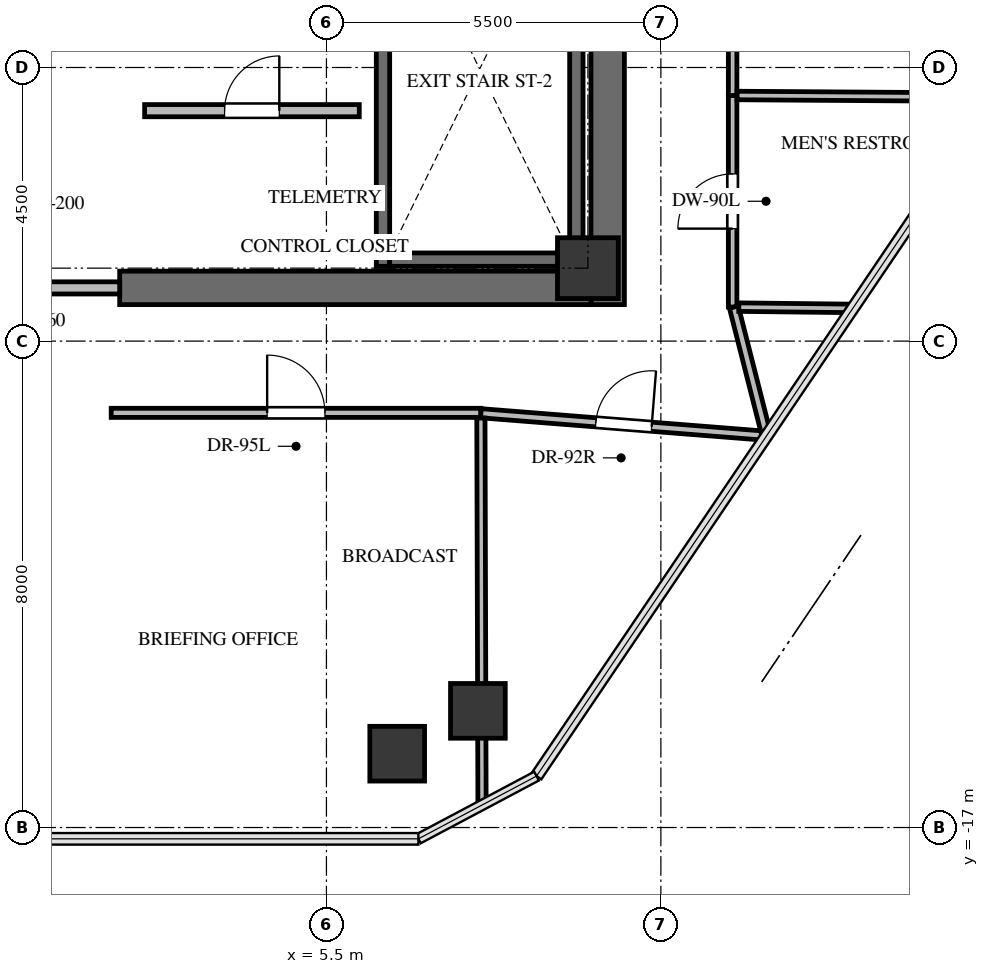
"""IFC4 building model, lengths in metres.
Left out: names, types, materials, properties, quantities, classifications, styles, units other than length and angle.
Written with IfcOpenShell. Run it as: python <this file> out.ifc"""

import sys

from ifc_helpers import new_model, si_unit, direction, frame, frame_2d, origin, origin_2d, place, context, subcontext, project, spatial, rectangle, extrude, source, transform, mapped, element, fill, save


model = new_model("IFC4")
c1 = context("Model", 3, precision=1e-05, world=origin(), true_north=direction((0.0, 1.0)))
c2 = subcontext(c1, "Body", "Model", "MODEL_VIEW")
j1 = project(units=[si_unit("LENGTHUNIT", "METRE"), si_unit("PLANEANGLEUNIT", "RADIAN")], contexts=[c1])
p1 = place(None, origin())
s1 = spatial("IfcSite", under=j1, at=p1, CompositionType="ELEMENT")
p2 = place(p1, origin())
s2 = spatial("IfcBuilding", under=s1, at=p2, CompositionType="ELEMENT")
p3 = place(p2, frame((0.0, 0.0, 231.5)))
s3 = spatial("IfcBuildingStorey", under=s2, at=p3, CompositionType="ELEMENT", Elevation=231.5)
p4 = place(p3, frame((10.125, -8.4, 0.0), z_axis=(0.0, 0.0, 1.0), x_axis=(0.0, 1.0, 0.0)))
e1 = element("IfcWall", 1, at=p4, inside=s3, PredefinedType="SHEAR", context=c2, shape_type="SweptSolid", body=[
    extrude(rectangle(XDim=16.8, YDim=0.55, at=frame_2d((8.4, 0.0))), origin(), (0.0, 0.0, 1.0), 3.3),
])
p5 = place(p3, frame((2.1, -8.125, 0.0), z_axis=(0.0, 0.0, 1.0), x_axis=(1.0, 0.0, 0.0)))
e2 = element("IfcWall", 2, at=p5, inside=s3, PredefinedType="SHEAR", context=c2, shape_type="SweptSolid", body=[
    extrude(rectangle(XDim=7.75, YDim=0.55, at=frame_2d((3.875, 0.0))), origin(), (0.0, 0.0, 1.0), 3.3),
])
p6 = place(p3, frame((9.61, -7.77, -0.24), z_axis=(0.0, 0.0, 1.0), x_axis=(0.0, 1.0, 0.0)))
e3 = element("IfcWall", 3, at=p6, inside=s3, PredefinedType="SHEAR", context=c2, shape_type="SweptSolid", body=[
    extrude(rectangle(XDim=7.89, YDim=0.22, at=frame_2d((3.945, 0.0))), origin(), (0.0, 0.0, 1.0), 3.3),
])
p7 = place(p3, frame((6.43, 0.12, -0.24), z_axis=(0.0, 0.0, 1.0), x_axis=(0.0, -1.0, 0.0)))
e4 = element("IfcWall", 4, at=p7, inside=s3, PredefinedType="SHEAR", context=c2, shape_type="SweptSolid", body=[
    extrude(rectangle(XDim=7.89, YDim=0.22, at=frame_2d((3.945, 0.0))), origin(), (0.0, 0.0, 1.0), 3.3),
])
p8 = place(p7, frame((0.52, 0.0, 0.0)))
e5 = element("IfcOpeningElement", 5, at=p8, cuts=e4, PredefinedType="OPENING", context=c2, shape_type="SweptSolid", body=[
    extrude(rectangle(XDim=1.05, YDim=2.15, at=frame_2d((0.525, 1.075))), frame((0.0, 0.12, 0.0), z_axis=(0.0, -1.0, 0.0), x_axis=(1.0, 0.0, 0.0)), (0.0, 0.0, 1.0), 0.24),
])
p9 = place(p3, frame((6.54, -7.66, -0.24), z_axis=(0.0, 0.0, 1.0), x_axis=(1.0, 0.0, 0.0)))
e6 = element("IfcWall", 6, at=p9, inside=s3, PredefinedType="SHEAR", context=c2, shape_type="SweptSolid", body=[
    extrude(rectangle(XDim=2.96, YDim=0.22, at=frame_2d((1.48, 0.0))), origin(), (0.0, 0.0, 1.0), 3.3),
])
m1 = source(origin(), c2, "Body", "SweptSolid", [
    extrude(rectangle(XDim=1.0, YDim=1.0, at=origin_2d()), origin(), (0.0, 0.0, 1.0), 3.3),
])
p10 = place(p3, frame((9.8, -7.8, -0.24), z_axis=(0.0, 0.0, 1.0), x_axis=(1.0, 0.0, 0.0)))
e7 = element("IfcColumn", 7, at=p10, inside=s3, PredefinedType="COLUMN", context=c2, shape_type="MappedRepresentation", body=[
    mapped(m1, transform((0.0, 0.0, 0.0), x_axis=(1.0, 0.0, 0.0), y_axis=(0.0, 1.0, 0.0), z_axis=(0.0, 0.0, 1.0), scale=1.0)),
])
m2 = source(origin(), c2, "Body", "SweptSolid", [
    extrude(rectangle(XDim=0.9, YDim=0.9, at=origin_2d()), origin(), (0.0, 0.0, 1.0), 3.3),
])
for number, where, z_axis, x_axis in (
    (8, (7.991, -15.081, -0.24), (0.0, 0.0, 1.0), (1.0, 0.0, 0.0)),
    (9, (6.664, -15.786, -0.24), (0.0, 0.0, 1.0), (1.0, 0.0, 0.0)),
):
    element("IfcColumn", number, at=place(p3, frame(where, z_axis=z_axis, x_axis=x_axis)), inside=s3, PredefinedType="COLUMN", context=c2, shape_type="MappedRepresentation", body=[
        mapped(m2, transform((0.0, 0.0, 0.0), x_axis=(1.0, 0.0, 0.0), y_axis=(0.0, 1.0, 0.0), z_axis=(0.0, 0.0, 1.0), scale=1.0)),
    ])
p11 = place(p3, frame((-2.1, -8.125, 0.0), z_axis=(0.0, 0.0, 1.0), x_axis=(1.0, 0.0, 0.0)))
e10 = element("IfcWall", 10, at=p11, inside=s3, PredefinedType="SOLIDWALL", context=c2, shape_type="SweptSolid", body=[
    extrude(rectangle(XDim=4.2, YDim=0.2, at=frame_2d((2.1, 0.0))), origin(), (0.0, 0.0, 1.0), 3.045),
])
p12 = place(p11, frame((1.2, 0.0, 0.0)))
e11 = element("IfcOpeningElement", 11, at=p12, cuts=e10, PredefinedType="OPENING", context=c2, shape_type="SweptSolid", body=[
    extrude(rectangle(XDim=1.8, YDim=2.15, at=frame_2d((0.9, 1.075))), frame((0.0, 0.11, 0.0), z_axis=(0.0, -1.0, 0.0), x_axis=(1.0, 0.0, 0.0)), (0.0, 0.0, 1.0), 0.22),
])
p13 = place(p3, frame((2.51, -5.21, 0.0), z_axis=(0.0, 0.0, 1.0), x_axis=(1.0, 0.0, 0.0)))
e12 = element("IfcWall", 12, at=p13, inside=s3, PredefinedType="SOLIDWALL", context=c2, shape_type="SweptSolid", body=[
    extrude(rectangle(XDim=3.53, YDim=0.2, at=frame_2d((1.765, 0.0))), origin(), (0.0, 0.0, 1.0), 3.045),
])
p14 = place(p13, frame((1.315, 0.0, 0.0)))
e13 = element("IfcOpeningElement", 13, at=p14, cuts=e12, PredefinedType="OPENING", context=c2, shape_type="SweptSolid", body=[
    extrude(rectangle(XDim=0.9, YDim=2.05, at=frame_2d((0.45, 1.025))), frame((0.0, 0.11, 0.0), z_axis=(0.0, -1.0, 0.0), x_axis=(1.0, 0.0, 0.0)), (0.0, 0.0, 1.0), 0.22),
])
p15 = place(p3, frame((12.18, -8.44, 0.0), z_axis=(0.0, 0.0, 1.0), x_axis=(0.0, 1.0, 0.0)))
e14 = element("IfcWall", 14, at=p15, inside=s3, PredefinedType="PARTITIONING", context=c2, shape_type="SweptSolid", body=[
    extrude(rectangle(XDim=3.48, YDim=0.14, at=frame_2d((1.74, 0.0))), origin(), (0.0, 0.0, 1.0), 2.399),
])
p16 = place(p15, frame((1.29, 0.0, 0.0)))
e15 = element("IfcOpeningElement", 15, at=p16, cuts=e14, PredefinedType="OPENING", context=c2, shape_type="SweptSolid", body=[
    extrude(rectangle(XDim=0.9, YDim=2.05, at=frame_2d((0.45, 1.025))), frame((0.0, 0.08, 0.0), z_axis=(0.0, -1.0, 0.0), x_axis=(1.0, 0.0, 0.0)), (0.0, 0.0, 1.0), 0.16),
])
p17 = place(p3, frame((12.18, -4.96, 0.0), z_axis=(0.0, 0.0, 1.0), x_axis=(0.0, 1.0, 0.0)))
e16 = element("IfcWall", 16, at=p17, inside=s3, PredefinedType="PARTITIONING", context=c2, shape_type="SweptSolid", body=[
    extrude(rectangle(XDim=3.4, YDim=0.14, at=frame_2d((1.7, 0.0))), origin(), (0.0, 0.0, 1.0), 3.045),
])
p18 = place(p17, frame((1.25, 0.0, 0.0)))
e17 = element("IfcOpeningElement", 17, at=p18, cuts=e16, PredefinedType="OPENING", context=c2, shape_type="SweptSolid", body=[
    extrude(rectangle(XDim=0.9, YDim=2.05, at=frame_2d((0.45, 1.025))), frame((0.0, 0.08, 0.0), z_axis=(0.0, -1.0, 0.0), x_axis=(1.0, 0.0, 0.0)), (0.0, 0.0, 1.0), 0.16),
])
p19 = place(p3, frame((1.96, -10.18, 0.0), z_axis=(0.0, 0.0, 1.0), x_axis=(1.0, 0.0, 0.0)))
e18 = element("IfcWall", 18, at=p19, inside=s3, PredefinedType="PARTITIONING", context=c2, shape_type="SweptSolid", body=[
    extrude(rectangle(XDim=6.08, YDim=0.15, at=frame_2d((3.04, 0.0))), origin(), (0.0, 0.0, 1.0), 2.301),
])
p20 = place(p19, frame((2.565, 0.0, 0.0)))
e19 = element("IfcOpeningElement", 19, at=p20, cuts=e18, PredefinedType="OPENING", context=c2, shape_type="SweptSolid", body=[
    extrude(rectangle(XDim=0.95, YDim=2.1, at=frame_2d((0.475, 1.05))), frame((0.0, 0.085, 0.0), z_axis=(0.0, -1.0, 0.0), x_axis=(1.0, 0.0, 0.0)), (0.0, 0.0, 1.0), 0.17),
])
p21 = place(p3, frame((8.04, -10.186, 0.0), z_axis=(0.0, 0.0, 1.0), x_axis=(0.996887981077, -0.078831168868, 0.0)))
e20 = element("IfcWall", 20, at=p21, inside=s3, PredefinedType="PARTITIONING", context=c2, shape_type="SweptSolid", body=[
    extrude(rectangle(XDim=4.714, YDim=0.15, at=frame_2d((2.357, 0.0))), origin(), (0.0, 0.0, 1.0), 2.399),
])
p22 = place(p21, frame((1.897, 0.0, 0.0)))
e21 = element("IfcOpeningElement", 21, at=p22, cuts=e20, PredefinedType="OPENING", context=c2, shape_type="SweptSolid", body=[
    extrude(rectangle(XDim=0.92, YDim=2.1, at=frame_2d((0.46, 1.05))), frame((0.0, 0.085, 0.0), z_axis=(0.0, -1.0, 0.0), x_axis=(1.0, 0.0, 0.0)), (0.0, 0.0, 1.0), 0.17),
])
p23 = place(p3, frame((12.718, -10.477, 0.0), z_axis=(0.0, 0.0, 1.0), x_axis=(-0.246496791887, 0.96914360731, 0.0)))
e22 = element("IfcWall", 22, at=p23, inside=s3, PredefinedType="PARTITIONING", context=c2, shape_type="SweptSolid", body=[
    extrude(rectangle(XDim=2.102, YDim=0.15, at=frame_2d((1.051, 0.0))), origin(), (0.0, 0.0, 1.0), 2.399),
])
p24 = place(p3, frame((12.254, -4.96, 0.0), z_axis=(0.0, 0.0, 1.0), x_axis=(0.999976630429, -0.006836563198, 0.0)))
e23 = element("IfcWall", 23, at=p24, inside=s3, PredefinedType="PARTITIONING", context=c2, shape_type="SweptSolid", body=[
    extrude(rectangle(XDim=4.25, YDim=0.14, at=frame_2d((2.125, 0.0))), origin(), (0.0, 0.0, 1.0), 2.399),
])
p25 = place(p3, frame((14.156, -8.462, 0.0), z_axis=(0.0, 0.0, 1.0), x_axis=(-0.999935742613, 0.011336253532, 0.0)))
e24 = element("IfcWall", 24, at=p25, inside=s3, PredefinedType="PARTITIONING", context=c2, shape_type="SweptSolid", body=[
    extrude(rectangle(XDim=1.874, YDim=0.14, at=frame_2d((0.937, 0.0))), origin(), (0.0, 0.0, 1.0), 2.399),
])
p26 = place(p3, frame((8.04, -10.266, 0.0), z_axis=(0.0, 0.0, 1.0), x_axis=(0.002906673097, -0.999995775617, 0.0)))
e25 = element("IfcWall", 25, at=p26, inside=s3, PredefinedType="PARTITIONING", context=c2, shape_type="SweptSolid", body=[
    extrude(rectangle(XDim=4.872, YDim=0.135, at=frame_2d((2.436, 0.0))), origin(), (0.0, 0.0, 1.0), 1.877),
])
p27 = place(p3, frame((8.055, -15.478, 0.0), z_axis=(0.0, 0.0, 1.0), x_axis=(0.002965460378, -0.999995603013, 0.0)))
e26 = element("IfcWall", 26, at=p27, inside=s3, PredefinedType="PARTITIONING", context=c2, shape_type="SweptSolid", body=[
    extrude(rectangle(XDim=1.153, YDim=0.135, at=frame_2d((0.576, 0.0))), origin(), (0.0, 0.0, 1.0), 3.045),
])
p28 = place(p3, frame((8.054, -15.137, 0.0), z_axis=(0.0, 0.0, 1.0), x_axis=(0.002867371725, -0.999995889081, 0.0)))
e27 = element("IfcWall", 27, at=p28, inside=s3, PredefinedType="PARTITIONING", context=c2, shape_type="SweptSolid", body=[
    extrude(rectangle(XDim=0.341, YDim=0.135, at=frame_2d((0.17, 0.0))), origin(), (0.0, 0.0, 1.0), 1.877),
])
m3 = source(origin(), c2, "Body", "SweptSolid", [
    extrude(rectangle(XDim=0.9, YDim=2.05, at=frame_2d((0.45, 1.025))), frame((0.0, 0.025, 0.0), z_axis=(0.0, -1.0, 0.0), x_axis=(1.0, 0.0, 0.0)), (0.0, 0.0, 1.0), 0.05),
])
p29 = place(p14, origin())
e28 = element("IfcDoor", 28, at=p29, inside=s3, OperationType="SINGLE_SWING_RIGHT", PredefinedType="DOOR", context=c2, shape_type="MappedRepresentation", body=[
    mapped(m3, transform((0.0, 0.0, 0.0), x_axis=(1.0, 0.0, 0.0), y_axis=(0.0, 1.0, 0.0), z_axis=(0.0, 0.0, 1.0), scale=1.0)),
])
fill(e13, e28)
m4 = source(origin(), c2, "Body", "SweptSolid", [
    extrude(rectangle(XDim=0.9, YDim=2.05, at=frame_2d((0.45, 1.025))), frame((0.0, 0.025, 0.0), z_axis=(0.0, -1.0, 0.0), x_axis=(1.0, 0.0, 0.0)), (0.0, 0.0, 1.0), 0.05),
])
p30 = place(p16, origin())
e29 = element("IfcDoor", 29, at=p30, inside=s3, OperationType="SINGLE_SWING_LEFT", PredefinedType="DOOR", context=c2, shape_type="MappedRepresentation", body=[
    mapped(m4, transform((0.0, 0.0, 0.0), x_axis=(1.0, 0.0, 0.0), y_axis=(0.0, 1.0, 0.0), z_axis=(0.0, 0.0, 1.0), scale=1.0)),
])
fill(e15, e29)
m5 = source(origin(), c2, "Body", "SweptSolid", [
    extrude(rectangle(XDim=0.95, YDim=2.1, at=frame_2d((0.475, 1.05))), frame((0.0, 0.025, 0.0), z_axis=(0.0, -1.0, 0.0), x_axis=(1.0, 0.0, 0.0)), (0.0, 0.0, 1.0), 0.05),
])
p31 = place(p20, origin())
e30 = element("IfcDoor", 30, at=p31, inside=s3, OperationType="SINGLE_SWING_LEFT", PredefinedType="DOOR", context=c2, shape_type="MappedRepresentation", body=[
    mapped(m5, transform((0.0, 0.0, 0.0), x_axis=(1.0, 0.0, 0.0), y_axis=(0.0, 1.0, 0.0), z_axis=(0.0, 0.0, 1.0), scale=1.0)),
])
fill(e19, e30)
m6 = source(origin(), c2, "Body", "SweptSolid", [
    extrude(rectangle(XDim=0.92, YDim=2.1, at=frame_2d((0.46, 1.05))), frame((0.0, 0.025, 0.0), z_axis=(0.0, -1.0, 0.0), x_axis=(1.0, 0.0, 0.0)), (0.0, 0.0, 1.0), 0.05),
])
p32 = place(p22, origin())
e31 = element("IfcDoor", 31, at=p32, inside=s3, OperationType="SINGLE_SWING_RIGHT", PredefinedType="DOOR", context=c2, shape_type="MappedRepresentation", body=[
    mapped(m6, transform((0.0, 0.0, 0.0), x_axis=(1.0, 0.0, 0.0), y_axis=(0.0, 1.0, 0.0), z_axis=(0.0, 0.0, 1.0), scale=1.0)),
])
fill(e21, e31)
save(model, sys.argv[1])
